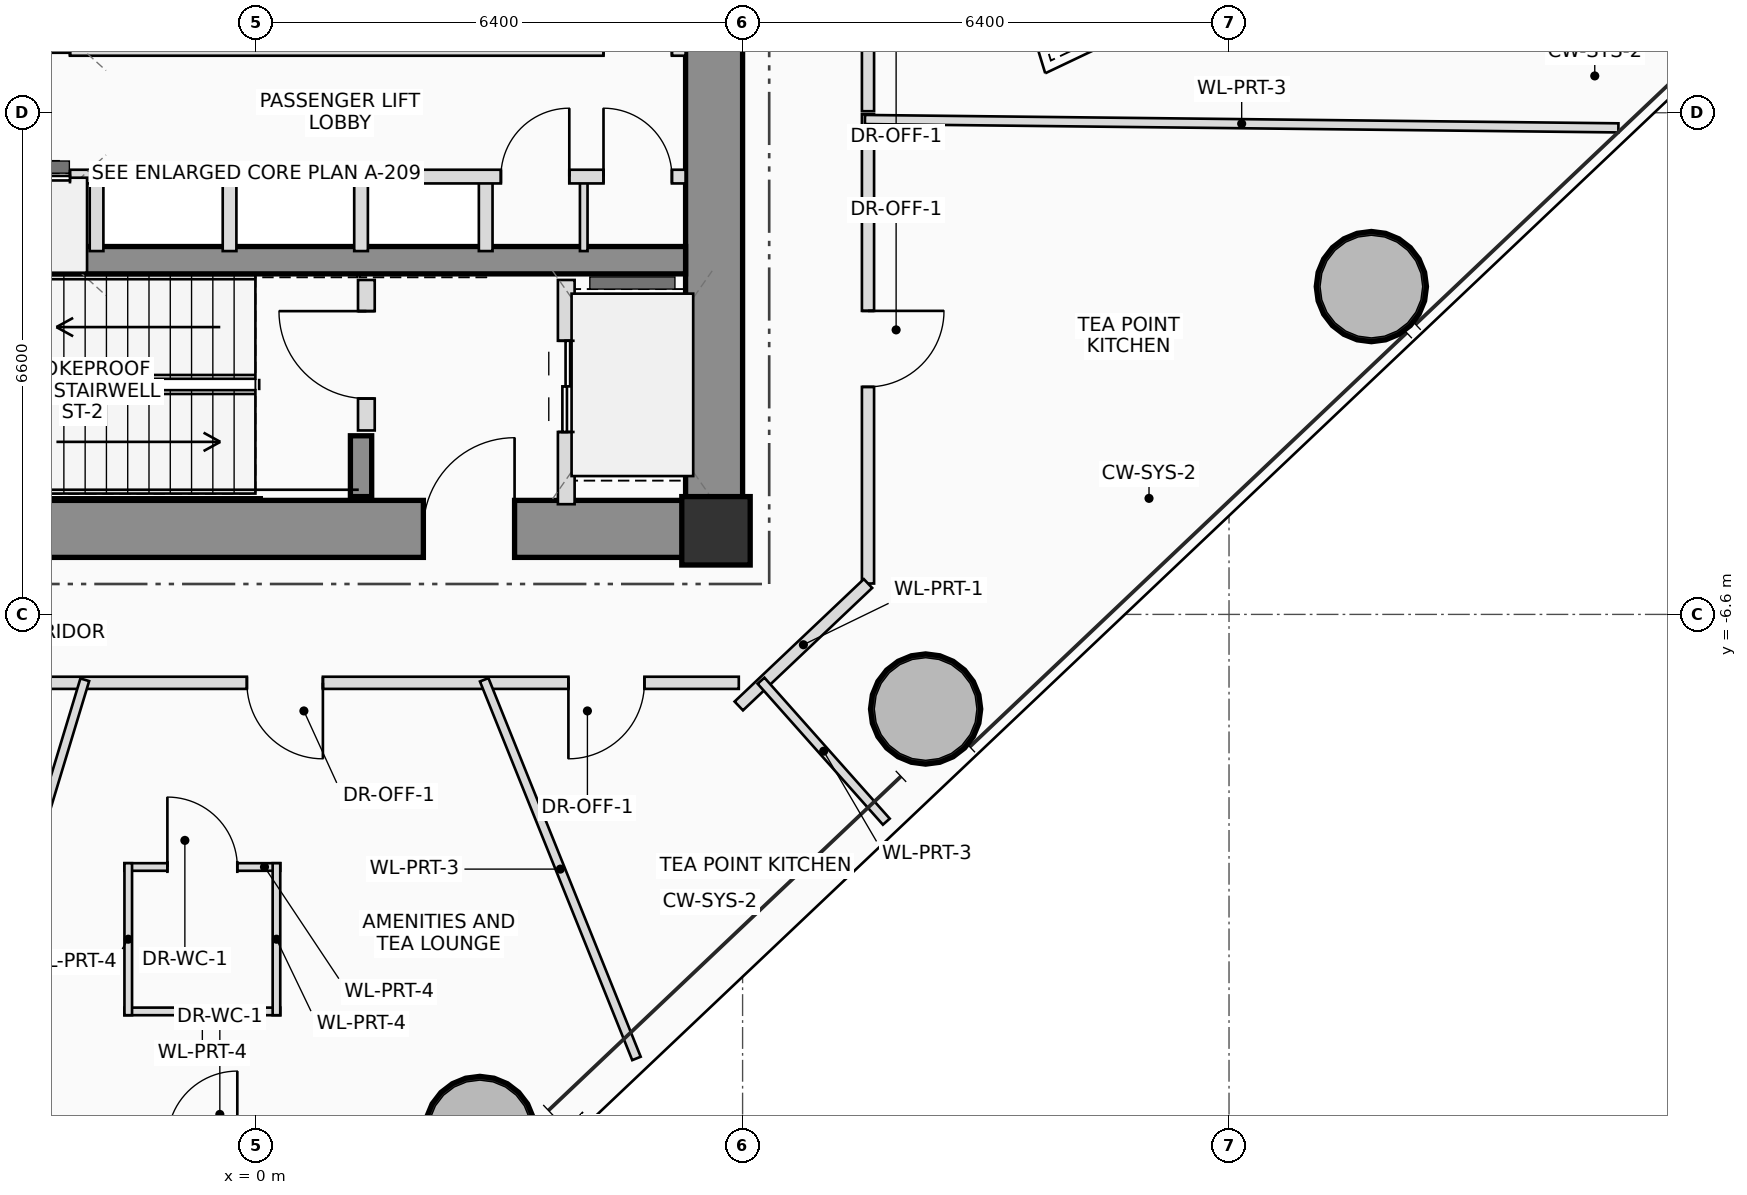
"""IFC4 building model, lengths in metres.
Left out: names, types, materials, properties, quantities, classifications, styles, units other than length and angle.
Written with IfcOpenShell. Run it as: python <this file> out.ifc"""

import sys

from ifc_helpers import new_model, si_unit, direction, frame, frame_2d, origin, origin_2d, place, context, subcontext, project, spatial, rectangle, hollow_circle, extrude, source, transform, mapped, element, fill, save


model = new_model("IFC4")
c1 = context("Model", 3, precision=1e-05, world=origin(), true_north=direction((0.0, 1.0)))
c2 = subcontext(c1, "Body", "Model", "MODEL_VIEW")
j1 = project(units=[si_unit("LENGTHUNIT", "METRE"), si_unit("PLANEANGLEUNIT", "RADIAN")], contexts=[c1])
p1 = place(None, origin())
s1 = spatial("IfcSite", under=j1, at=p1, CompositionType="ELEMENT")
p2 = place(p1, origin())
s2 = spatial("IfcBuilding", under=s1, at=p2, CompositionType="ELEMENT")
p3 = place(p2, frame((0.0, 0.0, 93.65)))
s3 = spatial("IfcBuildingStorey", under=s2, at=p3, CompositionType="ELEMENT", Elevation=93.65)
m1 = source(origin(), c2, "Body", "SweptSolid", [
    extrude(rectangle(XDim=0.9, YDim=0.9, at=origin_2d()), origin(), (0.0, 0.0, 1.0), 3.75),
])
p4 = place(p3, frame((6.05, -5.5, 0.0), z_axis=(0.0, 0.0, 1.0), x_axis=(1.0, 0.0, 0.0)))
e1 = element("IfcColumn", 1, at=p4, inside=s3, PredefinedType="COLUMN", context=c2, shape_type="MappedRepresentation", body=[
    mapped(m1, transform((0.0, 0.0, 0.0), scale=1.0)),
])
p5 = place(p3, frame((-6.4, -5.475, 0.0), z_axis=(0.0, 0.0, 1.0), x_axis=(1.0, 0.0, 0.0)))
e2 = element("IfcWall", 2, at=p5, inside=s3, PredefinedType="SHEAR", context=c2, shape_type="SweptSolid", body=[
    extrude(rectangle(XDim=12.8, YDim=0.75, at=frame_2d((6.4, 0.0))), origin(), (0.0, 0.0, 1.0), 3.75),
])
p6 = place(p5, frame((8.6, 0.0, 0.0)))
e3 = element("IfcOpeningElement", 3, at=p6, cuts=e2, PredefinedType="OPENING", context=c2, shape_type="SweptSolid", body=[
    extrude(rectangle(XDim=1.2, YDim=2.2, at=frame_2d((0.6, 1.1))), frame((0.0, 0.385, 0.0), z_axis=(0.0, -1.0, 0.0), x_axis=(1.0, 0.0, 0.0)), (0.0, 0.0, 1.0), 0.77),
])
p7 = place(p3, frame((6.025, -5.1, 0.0), z_axis=(0.0, 0.0, 1.0), x_axis=(0.0, 1.0, 0.0)))
e4 = element("IfcWall", 4, at=p7, inside=s3, PredefinedType="SHEAR", context=c2, shape_type="SweptSolid", body=[
    extrude(rectangle(XDim=10.2, YDim=0.75, at=frame_2d((5.1, 0.0))), origin(), (0.0, 0.0, 1.0), 3.75),
])
p8 = place(p3, frame((-5.65, -1.94, 0.0), z_axis=(0.0, 0.0, 1.0), x_axis=(1.0, 0.0, 0.0)))
e5 = element("IfcWall", 5, at=p8, inside=s3, PredefinedType="SHEAR", context=c2, shape_type="SweptSolid", body=[
    extrude(rectangle(XDim=11.3, YDim=0.36, at=frame_2d((5.65, 0.0))), origin(), (0.0, 0.0, 1.0), 3.75),
])
p9 = place(p3, frame((1.38, -5.05, 0.0), z_axis=(0.0, 0.0, 1.0), x_axis=(0.0, 1.0, 0.0)))
e6 = element("IfcWall", 6, at=p9, inside=s3, PredefinedType="SHEAR", context=c2, shape_type="SweptSolid", body=[
    extrude(rectangle(XDim=0.8, YDim=0.28, at=frame_2d((0.4, 0.0))), origin(), (0.0, 0.0, 1.0), 3.75),
])
m2 = source(origin(), c2, "Body", "SweptSolid", [
    extrude(hollow_circle(Radius=0.725, WallThickness=0.05, at=origin_2d()), origin(), (0.0, 0.0, 1.0), 3.75),
])
for number, where, z_axis, x_axis in (
    (7, (2.943, -13.402, 0.0), (0.0, 0.0, 1.0), (1.0, 0.0, 0.0)),
    (8, (8.808, -7.845, 0.0), (0.0, 0.0, 1.0), (1.0, 0.0, 0.0)),
    (9, (14.673, -2.287, 0.0), (0.0, 0.0, 1.0), (1.0, 0.0, 0.0)),
):
    element("IfcColumn", number, at=place(p3, frame(where, z_axis=z_axis, x_axis=x_axis)), inside=s3, PredefinedType="COLUMN", context=c2, shape_type="MappedRepresentation", body=[
        mapped(m2, transform((0.0, 0.0, 0.0), scale=1.0)),
    ])
p10 = place(p3, frame((1.45, -4.18, 0.0), z_axis=(0.0, 0.0, 1.0), x_axis=(0.0, 1.0, 0.0)))
e10 = element("IfcWall", 10, at=p10, inside=s3, PredefinedType="PLUMBINGWALL", context=c2, shape_type="SweptSolid", body=[
    extrude(rectangle(XDim=1.98, YDim=0.22, at=frame_2d((0.99, 0.0))), origin(), (0.0, 0.0, 1.0), 3.545),
])
p11 = place(p10, frame((0.42, 0.0, 0.0)))
e11 = element("IfcOpeningElement", 11, at=p11, cuts=e10, PredefinedType="OPENING", context=c2, shape_type="SweptSolid", body=[
    extrude(rectangle(XDim=1.15, YDim=2.15, at=frame_2d((0.575, 1.075))), frame((0.0, 0.12, 0.0), z_axis=(0.0, -1.0, 0.0), x_axis=(1.0, 0.0, 0.0)), (0.0, 0.0, 1.0), 0.24),
])
p12 = place(p3, frame((4.08, -5.15, 0.0), z_axis=(0.0, 0.0, 1.0), x_axis=(0.0, 1.0, 0.0)))
e12 = element("IfcWall", 12, at=p12, inside=s3, PredefinedType="PLUMBINGWALL", context=c2, shape_type="SweptSolid", body=[
    extrude(rectangle(XDim=2.95, YDim=0.22, at=frame_2d((1.475, 0.0))), origin(), (0.0, 0.0, 1.0), 3.545),
])
p13 = place(p12, frame((0.95, 0.0, 0.0)))
e13 = element("IfcOpeningElement", 13, at=p13, cuts=e12, PredefinedType="OPENING", context=c2, shape_type="SweptSolid", body=[
    extrude(rectangle(XDim=1.2, YDim=2.25, at=frame_2d((0.6, 1.125))), frame((0.0, 0.12, 0.0), z_axis=(0.0, -1.0, 0.0), x_axis=(1.0, 0.0, 0.0)), (0.0, 0.0, 1.0), 0.24),
])
for number, where, z_axis, x_axis in (
    (14, (-2.1, -1.82, 0.0), (0.0, 0.0, 1.0), (0.0, 1.0, 0.0)),
    (15, (-0.35, -1.82, 0.0), (0.0, 0.0, 1.0), (0.0, 1.0, 0.0)),
    (16, (1.38, -1.82, 0.0), (0.0, 0.0, 1.0), (0.0, 1.0, 0.0)),
    (17, (3.02, -1.82, 0.0), (0.0, 0.0, 1.0), (0.0, 1.0, 0.0)),
):
    element("IfcWall", number, at=place(p3, frame(where, z_axis=z_axis, x_axis=x_axis)), inside=s3, PredefinedType="PLUMBINGWALL", context=c2, shape_type="SweptSolid", body=[
        extrude(rectangle(XDim=0.98, YDim=0.18, at=frame_2d((0.49, 0.0))), origin(), (0.0, 0.0, 1.0), 3.545),
    ])
p14 = place(p3, frame((4.31, -1.82, 0.0), z_axis=(0.0, 0.0, 1.0), x_axis=(0.0, 1.0, 0.0)))
e18 = element("IfcWall", 18, at=p14, inside=s3, PredefinedType="PARTITIONING", context=c2, shape_type="SweptSolid", body=[
    extrude(rectangle(XDim=0.98, YDim=0.1, at=frame_2d((0.49, 0.0))), origin(), (0.0, 0.0, 1.0), 3.545),
])
p15 = place(p3, frame((-5.68, 0.84, 0.0), z_axis=(0.0, 0.0, 1.0), x_axis=(1.0, 0.0, 0.0)))
e19 = element("IfcWall", 19, at=p15, inside=s3, PredefinedType="PLUMBINGWALL", context=c2, shape_type="SweptSolid", body=[
    extrude(rectangle(XDim=11.33, YDim=0.18, at=frame_2d((5.665, 0.0))), origin(), (0.0, 0.0, 1.0), 3.545),
])
p16 = place(p15, frame((0.43, 0.0, 0.0)))
e20 = element("IfcOpeningElement", 20, at=p16, cuts=e19, PredefinedType="OPENING", context=c2, shape_type="SweptSolid", body=[
    extrude(rectangle(XDim=1.1, YDim=2.2, at=frame_2d((0.55, 1.1))), frame((0.0, 0.1, 0.0), z_axis=(0.0, -1.0, 0.0), x_axis=(1.0, 0.0, 0.0)), (0.0, 0.0, 1.0), 0.2),
])
p17 = place(p15, frame((2.13, 0.0, 0.0)))
e21 = element("IfcOpeningElement", 21, at=p17, cuts=e19, PredefinedType="OPENING", context=c2, shape_type="SweptSolid", body=[
    extrude(rectangle(XDim=1.1, YDim=2.2, at=frame_2d((0.55, 1.1))), frame((0.0, 0.1, 0.0), z_axis=(0.0, -1.0, 0.0), x_axis=(1.0, 0.0, 0.0)), (0.0, 0.0, 1.0), 0.2),
])
p18 = place(p15, frame((10.25, 0.0, 0.0)))
e22 = element("IfcOpeningElement", 22, at=p18, cuts=e19, PredefinedType="OPENING", context=c2, shape_type="SweptSolid", body=[
    extrude(rectangle(XDim=0.9, YDim=2.05, at=frame_2d((0.45, 1.025))), frame((0.0, 0.1, 0.0), z_axis=(0.0, -1.0, 0.0), x_axis=(1.0, 0.0, 0.0)), (0.0, 0.0, 1.0), 0.2),
])
p19 = place(p3, frame((-5.68, -0.84, 0.0), z_axis=(0.0, 0.0, 1.0), x_axis=(1.0, 0.0, 0.0)))
e23 = element("IfcWall", 23, at=p19, inside=s3, PredefinedType="PLUMBINGWALL", context=c2, shape_type="SweptSolid", body=[
    extrude(rectangle(XDim=11.33, YDim=0.18, at=frame_2d((5.665, 0.0))), origin(), (0.0, 0.0, 1.0), 3.545),
])
p20 = place(p19, frame((0.43, 0.0, 0.0)))
e24 = element("IfcOpeningElement", 24, at=p20, cuts=e23, PredefinedType="OPENING", context=c2, shape_type="SweptSolid", body=[
    extrude(rectangle(XDim=1.1, YDim=2.2, at=frame_2d((0.55, 1.1))), frame((0.0, 0.1, 0.0), z_axis=(0.0, -1.0, 0.0), x_axis=(1.0, 0.0, 0.0)), (0.0, 0.0, 1.0), 0.2),
])
p21 = place(p19, frame((2.13, 0.0, 0.0)))
e25 = element("IfcOpeningElement", 25, at=p21, cuts=e23, PredefinedType="OPENING", context=c2, shape_type="SweptSolid", body=[
    extrude(rectangle(XDim=1.1, YDim=2.2, at=frame_2d((0.55, 1.1))), frame((0.0, 0.1, 0.0), z_axis=(0.0, -1.0, 0.0), x_axis=(1.0, 0.0, 0.0)), (0.0, 0.0, 1.0), 0.2),
])
p22 = place(p19, frame((8.9, 0.0, 0.0)))
e26 = element("IfcOpeningElement", 26, at=p22, cuts=e23, PredefinedType="OPENING", context=c2, shape_type="SweptSolid", body=[
    extrude(rectangle(XDim=0.9, YDim=2.05, at=frame_2d((0.45, 1.025))), frame((0.0, 0.1, 0.0), z_axis=(0.0, -1.0, 0.0), x_axis=(1.0, 0.0, 0.0)), (0.0, 0.0, 1.0), 0.2),
])
p23 = place(p19, frame((10.25, 0.0, 0.0)))
e27 = element("IfcOpeningElement", 27, at=p23, cuts=e23, PredefinedType="OPENING", context=c2, shape_type="SweptSolid", body=[
    extrude(rectangle(XDim=0.9, YDim=2.05, at=frame_2d((0.45, 1.025))), frame((0.0, 0.1, 0.0), z_axis=(0.0, -1.0, 0.0), x_axis=(1.0, 0.0, 0.0)), (0.0, 0.0, 1.0), 0.2),
])
p24 = place(p3, frame((-1.733, -9.923, 0.0), z_axis=(0.0, 0.0, 1.0), x_axis=(1.0, 0.0, 0.0)))
e28 = element("IfcWall", 28, at=p24, inside=s3, PredefinedType="PARTITIONING", context=c2, shape_type="SweptSolid", body=[
    extrude(rectangle(XDim=2.05, YDim=0.1, at=frame_2d((1.025, 0.0))), origin(), (0.0, 0.0, 1.0), 3.545),
])
p25 = place(p24, frame((0.565, 0.0, 0.0)))
e29 = element("IfcOpeningElement", 29, at=p25, cuts=e28, PredefinedType="OPENING", context=c2, shape_type="SweptSolid", body=[
    extrude(rectangle(XDim=0.92, YDim=2.1, at=frame_2d((0.46, 1.05))), frame((0.0, 0.06, 0.0), z_axis=(0.0, -1.0, 0.0), x_axis=(1.0, 0.0, 0.0)), (0.0, 0.0, 1.0), 0.12),
])
p26 = place(p3, frame((0.317, -11.823, 0.0), z_axis=(0.0, 0.0, 1.0), x_axis=(-1.0, 0.0, 0.0)))
e30 = element("IfcWall", 30, at=p26, inside=s3, PredefinedType="PARTITIONING", context=c2, shape_type="SweptSolid", body=[
    extrude(rectangle(XDim=2.05, YDim=0.1, at=frame_2d((1.025, 0.0))), origin(), (0.0, 0.0, 1.0), 3.05),
])
for number, where, z_axis, x_axis in (
    (31, (0.267, -9.873, 0.0), (0.0, 0.0, 1.0), (0.0, -1.0, 0.0)),
    (32, (-1.683, -11.873, 0.0), (0.0, 0.0, 1.0), (0.0, 1.0, 0.0)),
):
    element("IfcWall", number, at=place(p3, frame(where, z_axis=z_axis, x_axis=x_axis)), inside=s3, PredefinedType="PARTITIONING", context=c2, shape_type="SweptSolid", body=[
        extrude(rectangle(XDim=2.0, YDim=0.1, at=frame_2d((1.0, 0.0))), origin(), (0.0, 0.0, 1.0), 3.05),
    ])
p27 = place(p3, frame((8.05, 7.5, 0.0), z_axis=(0.0, 0.0, 1.0), x_axis=(0.0, -1.0, 0.0)))
e33 = element("IfcWall", 33, at=p27, inside=s3, PredefinedType="PARTITIONING", context=c2, shape_type="SweptSolid", body=[
    extrude(rectangle(XDim=7.48, YDim=0.16, at=frame_2d((3.74, 0.0))), origin(), (0.0, 0.0, 1.0), 2.85),
])
p28 = place(p27, frame((5.491, 0.0, 0.0)))
e34 = element("IfcOpeningElement", 34, at=p28, cuts=e33, PredefinedType="OPENING", context=c2, shape_type="SweptSolid", body=[
    extrude(rectangle(XDim=1.0, YDim=2.25, at=frame_2d((0.5, 1.125))), frame((0.0, 0.09, 0.0), z_axis=(0.0, -1.0, 0.0), x_axis=(1.0, 0.0, 0.0)), (0.0, 0.0, 1.0), 0.18),
])
p29 = place(p3, frame((8.05, -0.02, 0.0), z_axis=(0.0, 0.0, 1.0), x_axis=(0.0, -1.0, 0.0)))
e35 = element("IfcWall", 35, at=p29, inside=s3, PredefinedType="PARTITIONING", context=c2, shape_type="SweptSolid", body=[
    extrude(rectangle(XDim=6.174, YDim=0.16, at=frame_2d((3.087, 0.0))), origin(), (0.0, 0.0, 1.0), 2.85),
])
p30 = place(p29, frame((2.587, 0.0, 0.0)))
e36 = element("IfcOpeningElement", 36, at=p30, cuts=e35, PredefinedType="OPENING", context=c2, shape_type="SweptSolid", body=[
    extrude(rectangle(XDim=1.0, YDim=2.25, at=frame_2d((0.5, 1.125))), frame((0.0, 0.09, 0.0), z_axis=(0.0, -1.0, 0.0), x_axis=(1.0, 0.0, 0.0)), (0.0, 0.0, 1.0), 0.18),
])
p31 = place(p3, frame((8.05, -6.194, 0.0), z_axis=(0.0, 0.0, 1.0), x_axis=(-0.725875977514, -0.687825606726, 0.0)))
e37 = element("IfcWall", 37, at=p31, inside=s3, PredefinedType="PARTITIONING", context=c2, shape_type="SweptSolid", body=[
    extrude(rectangle(XDim=2.342, YDim=0.16, at=frame_2d((1.171, 0.0))), origin(), (0.0, 0.0, 1.0), 2.85),
])
p32 = place(p3, frame((6.35, -7.5, 0.0), z_axis=(0.0, 0.0, 1.0), x_axis=(-1.0, 0.0, 0.0)))
e38 = element("IfcWall", 38, at=p32, inside=s3, PredefinedType="PARTITIONING", context=c2, shape_type="SweptSolid", body=[
    extrude(rectangle(XDim=12.7, YDim=0.16, at=frame_2d((6.35, 0.0))), origin(), (0.0, 0.0, 1.0), 2.85),
])
p33 = place(p32, frame((1.242, 0.0, 0.0)))
e39 = element("IfcOpeningElement", 39, at=p33, cuts=e38, PredefinedType="OPENING", context=c2, shape_type="SweptSolid", body=[
    extrude(rectangle(XDim=1.0, YDim=2.25, at=frame_2d((0.5, 1.125))), frame((0.0, 0.09, 0.0), z_axis=(0.0, -1.0, 0.0), x_axis=(1.0, 0.0, 0.0)), (0.0, 0.0, 1.0), 0.18),
])
p34 = place(p32, frame((5.472, 0.0, 0.0)))
e40 = element("IfcOpeningElement", 40, at=p34, cuts=e38, PredefinedType="OPENING", context=c2, shape_type="SweptSolid", body=[
    extrude(rectangle(XDim=1.0, YDim=2.25, at=frame_2d((0.5, 1.125))), frame((0.0, 0.09, 0.0), z_axis=(0.0, -1.0, 0.0), x_axis=(1.0, 0.0, 0.0)), (0.0, 0.0, 1.0), 0.18),
])
p35 = place(p3, frame((-2.255, -7.46, 0.0), z_axis=(0.0, 0.0, 1.0), x_axis=(-0.289332531311, -0.957228648926, 0.0)))
e41 = element("IfcWall", 41, at=p35, inside=s3, PredefinedType="PARTITIONING", context=c2, shape_type="SweptSolid", body=[
    extrude(rectangle(XDim=14.611, YDim=0.12, at=frame_2d((7.305, 0.0))), origin(), (0.0, 0.0, 1.0), 2.85),
])
p36 = place(p3, frame((3.0, -7.46, 0.0), z_axis=(0.0, 0.0, 1.0), x_axis=(0.37313810105, -0.927775812115, 0.0)))
e42 = element("IfcWall", 42, at=p36, inside=s3, PredefinedType="PARTITIONING", context=c2, shape_type="SweptSolid", body=[
    extrude(rectangle(XDim=5.37, YDim=0.12, at=frame_2d((2.685, 0.0))), origin(), (0.0, 0.0, 1.0), 2.85),
])
p37 = place(p3, frame((6.643, -7.472, 0.0), z_axis=(0.0, 0.0, 1.0), x_axis=(0.66436383883, -0.747409318684, 0.0)))
e43 = element("IfcWall", 43, at=p37, inside=s3, PredefinedType="PARTITIONING", context=c2, shape_type="SweptSolid", body=[
    extrude(rectangle(XDim=2.481, YDim=0.12, at=frame_2d((1.241, 0.0))), origin(), (0.0, 0.0, 1.0), 3.01),
])
p38 = place(p3, frame((8.01, -0.089, 0.0), z_axis=(0.0, 0.0, 1.0), x_axis=(0.999938319872, -0.011106594972, 0.0)))
e44 = element("IfcWall", 44, at=p38, inside=s3, PredefinedType="PARTITIONING", context=c2, shape_type="SweptSolid", body=[
    extrude(rectangle(XDim=9.914, YDim=0.12, at=frame_2d((4.957, 0.0))), origin(), (0.0, 0.0, 1.0), 2.85),
])
p39 = place(p6, origin())
e45 = element("IfcDoor", 45, at=p39, inside=s3, OperationType="SINGLE_SWING_RIGHT", PredefinedType="DOOR", context=c2, shape_type="SweptSolid", body=[
    extrude(rectangle(XDim=1.2, YDim=2.2, at=frame_2d((0.6, 1.1))), frame((0.0, 0.025, 0.0), z_axis=(0.0, -1.0, 0.0), x_axis=(1.0, 0.0, 0.0)), (0.0, 0.0, 1.0), 0.05),
])
fill(e3, e45)
p40 = place(p11, origin())
e46 = element("IfcDoor", 46, at=p40, inside=s3, OperationType="SINGLE_SWING_RIGHT", PredefinedType="DOOR", context=c2, shape_type="SweptSolid", body=[
    extrude(rectangle(XDim=1.15, YDim=2.15, at=frame_2d((0.575, 1.075))), frame((0.0, 0.025, 0.0), z_axis=(0.0, -1.0, 0.0), x_axis=(1.0, 0.0, 0.0)), (0.0, 0.0, 1.0), 0.05),
])
fill(e11, e46)
p41 = place(p13, origin())
e47 = element("IfcDoor", 47, at=p41, inside=s3, OperationType="DOUBLE_DOOR_SLIDING", PredefinedType="DOOR", context=c2, shape_type="SweptSolid", body=[
    extrude(rectangle(XDim=1.2, YDim=2.25, at=frame_2d((0.6, 1.125))), frame((0.0, 0.025, 0.0), z_axis=(0.0, -1.0, 0.0), x_axis=(1.0, 0.0, 0.0)), (0.0, 0.0, 1.0), 0.05),
])
fill(e13, e47)
p42 = place(p21, origin())
e48 = element("IfcDoor", 48, at=p42, inside=s3, OperationType="DOUBLE_DOOR_SLIDING", PredefinedType="DOOR", context=c2, shape_type="SweptSolid", body=[
    extrude(rectangle(XDim=1.1, YDim=2.2, at=frame_2d((0.55, 1.1))), frame((0.0, 0.025, 0.0), z_axis=(0.0, -1.0, 0.0), x_axis=(1.0, 0.0, 0.0)), (0.0, 0.0, 1.0), 0.05),
])
fill(e25, e48)
p43 = place(p22, origin())
e49 = element("IfcDoor", 49, at=p43, inside=s3, OperationType="SINGLE_SWING_RIGHT", PredefinedType="DOOR", context=c2, shape_type="SweptSolid", body=[
    extrude(rectangle(XDim=0.9, YDim=2.05, at=frame_2d((0.45, 1.025))), frame((0.0, 0.025, 0.0), z_axis=(0.0, -1.0, 0.0), x_axis=(1.0, 0.0, 0.0)), (0.0, 0.0, 1.0), 0.05),
])
fill(e26, e49)
p44 = place(p23, origin())
e50 = element("IfcDoor", 50, at=p44, inside=s3, OperationType="SINGLE_SWING_LEFT", PredefinedType="DOOR", context=c2, shape_type="SweptSolid", body=[
    extrude(rectangle(XDim=0.9, YDim=2.05, at=frame_2d((0.45, 1.025))), frame((0.0, 0.025, 0.0), z_axis=(0.0, -1.0, 0.0), x_axis=(1.0, 0.0, 0.0)), (0.0, 0.0, 1.0), 0.05),
])
fill(e27, e50)
p45 = place(p25, origin())
e51 = element("IfcDoor", 51, at=p45, inside=s3, OperationType="SINGLE_SWING_LEFT", PredefinedType="DOOR", context=c2, shape_type="SweptSolid", body=[
    extrude(rectangle(XDim=0.92, YDim=2.1, at=frame_2d((0.46, 1.05))), frame((0.0, 0.025, 0.0), z_axis=(0.0, -1.0, 0.0), x_axis=(1.0, 0.0, 0.0)), (0.0, 0.0, 1.0), 0.05),
])
fill(e29, e51)
p46 = place(p30, origin())
e52 = element("IfcDoor", 52, at=p46, inside=s3, OperationType="SINGLE_SWING_LEFT", PredefinedType="DOOR", context=c2, shape_type="SweptSolid", body=[
    extrude(rectangle(XDim=1.0, YDim=2.25, at=frame_2d((0.5, 1.125))), frame((0.0, 0.025, 0.0), z_axis=(0.0, -1.0, 0.0), x_axis=(1.0, 0.0, 0.0)), (0.0, 0.0, 1.0), 0.05),
])
fill(e36, e52)
p47 = place(p33, origin())
e53 = element("IfcDoor", 53, at=p47, inside=s3, OperationType="SINGLE_SWING_RIGHT", PredefinedType="DOOR", context=c2, shape_type="SweptSolid", body=[
    extrude(rectangle(XDim=1.0, YDim=2.25, at=frame_2d((0.5, 1.125))), frame((0.0, 0.025, 0.0), z_axis=(0.0, -1.0, 0.0), x_axis=(1.0, 0.0, 0.0)), (0.0, 0.0, 1.0), 0.05),
])
fill(e39, e53)
p48 = place(p34, origin())
e54 = element("IfcDoor", 54, at=p48, inside=s3, OperationType="SINGLE_SWING_LEFT", PredefinedType="DOOR", context=c2, shape_type="SweptSolid", body=[
    extrude(rectangle(XDim=1.0, YDim=2.25, at=frame_2d((0.5, 1.125))), frame((0.0, 0.025, 0.0), z_axis=(0.0, -1.0, 0.0), x_axis=(1.0, 0.0, 0.0)), (0.0, 0.0, 1.0), 0.05),
])
fill(e40, e54)
save(model, sys.argv[1])
